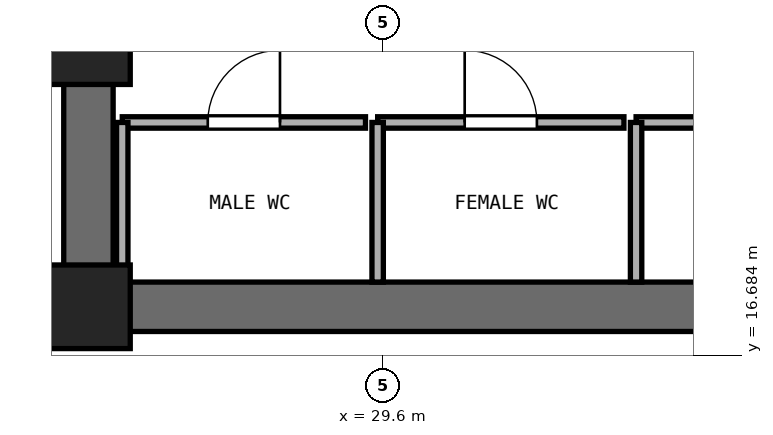
"""IFC4 building model, lengths in metres.
Left out: names, types, materials, properties, quantities, classifications, styles, units other than length and angle.
Written with IfcOpenShell. Run it as: python <this file> out.ifc"""

import sys

from ifc_helpers import new_model, si_unit, direction, frame, frame_2d, origin, origin_2d, place, context, subcontext, project, spatial, rectangle, extrude, element, fill, save


model = new_model("IFC4")
c1 = context("Model", 3, precision=1e-05, world=origin(), true_north=direction((0.0, 1.0)))
c2 = subcontext(c1, "Body", "Model", "MODEL_VIEW")
j1 = project(units=[si_unit("LENGTHUNIT", "METRE"), si_unit("PLANEANGLEUNIT", "RADIAN")], contexts=[c1])
p1 = place(None, origin())
s1 = spatial("IfcSite", under=j1, at=p1, CompositionType="ELEMENT")
p2 = place(p1, origin())
s2 = spatial("IfcBuilding", under=s1, at=p2, CompositionType="ELEMENT")
p3 = place(p2, frame((0.0, 0.0, 32.6)))
s3 = spatial("IfcBuildingStorey", under=s2, at=p3, CompositionType="ELEMENT", Elevation=32.6)
p4 = place(p3, frame((25.4, 17.325, 0.0), z_axis=(0.0, 0.0, 1.0), x_axis=(1.0, 0.0, 0.0)))
e1 = element("IfcWall", 1, at=p4, inside=s3, PredefinedType="SHEAR", context=c2, shape_type="SweptSolid", body=[
    extrude(rectangle(XDim=23.2, YDim=0.65, at=frame_2d((11.6, 0.0))), origin(), (0.0, 0.0, 1.0), 3.525),
])
p5 = place(p3, frame((25.725, 17.65, 0.0), z_axis=(0.0, 0.0, 1.0), x_axis=(0.0, 1.0, 0.0)))
e2 = element("IfcWall", 2, at=p5, inside=s3, PredefinedType="SHEAR", context=c2, shape_type="SweptSolid", body=[
    extrude(rectangle(XDim=15.1, YDim=0.65, at=frame_2d((7.55, 0.0))), origin(), (0.0, 0.0, 1.0), 3.525),
])
p6 = place(p5, frame((6.8, 0.0, 0.0)))
e3 = element("IfcOpeningElement", 3, at=p6, cuts=e2, PredefinedType="OPENING", context=c2, shape_type="SweptSolid", body=[
    extrude(rectangle(XDim=1.5, YDim=2.15, at=frame_2d((0.75, 1.075))), frame((0.0, 0.335, 0.0), z_axis=(0.0, -1.0, 0.0), x_axis=(1.0, 0.0, 0.0)), (0.0, 0.0, 1.0), 0.67),
])
for number, where, z_axis, x_axis in (
    (4, (25.725, 17.325, 0.0), (0.0, 0.0, 1.0), (1.0, 0.0, 0.0)),
    (5, (25.725, 20.8, 0.0), (0.0, 0.0, 1.0), (1.0, 0.0, 0.0)),
):
    element("IfcColumn", number, at=place(p3, frame(where, z_axis=z_axis, x_axis=x_axis)), inside=s3, PredefinedType="PILASTER", context=c2, shape_type="SweptSolid", body=[
        extrude(rectangle(XDim=1.1, YDim=1.1, at=origin_2d()), origin(), (0.0, 0.0, 1.0), 3.8),
    ])
p7 = place(p3, frame((26.17, 19.75, 0.0), z_axis=(0.0, 0.0, 1.0), x_axis=(1.0, 0.0, 0.0)))
e6 = element("IfcWall", 6, at=p7, inside=s3, PredefinedType="PARTITIONING", context=c2, shape_type="SweptSolid", body=[
    extrude(rectangle(XDim=3.2, YDim=0.15, at=frame_2d((1.6, 0.0))), origin(), (0.0, 0.0, 1.0), 3.525),
])
p8 = place(p7, frame((1.125, 0.0, 0.0)))
e7 = element("IfcOpeningElement", 7, at=p8, cuts=e6, PredefinedType="OPENING", context=c2, shape_type="SweptSolid", body=[
    extrude(rectangle(XDim=0.95, YDim=2.1, at=frame_2d((0.475, 1.05))), frame((0.0, 0.085, 0.0), z_axis=(0.0, -1.0, 0.0), x_axis=(1.0, 0.0, 0.0)), (0.0, 0.0, 1.0), 0.17),
])
p9 = place(p3, frame((26.17, 17.65, 0.0), z_axis=(0.0, 0.0, 1.0), x_axis=(0.0, 1.0, 0.0)))
e8 = element("IfcWall", 8, at=p9, inside=s3, PredefinedType="PARTITIONING", context=c2, shape_type="SweptSolid", body=[
    extrude(rectangle(XDim=2.1, YDim=0.15, at=frame_2d((1.05, 0.0))), origin(), (0.0, 0.0, 1.0), 3.525),
])
p10 = place(p3, frame((29.53, 19.75, 0.0), z_axis=(0.0, 0.0, 1.0), x_axis=(1.0, 0.0, 0.0)))
e9 = element("IfcWall", 9, at=p10, inside=s3, PredefinedType="PARTITIONING", context=c2, shape_type="SweptSolid", body=[
    extrude(rectangle(XDim=3.24, YDim=0.15, at=frame_2d((1.62, 0.0))), origin(), (0.0, 0.0, 1.0), 3.525),
])
p11 = place(p10, frame((1.145, 0.0, 0.0)))
e10 = element("IfcOpeningElement", 10, at=p11, cuts=e9, PredefinedType="OPENING", context=c2, shape_type="SweptSolid", body=[
    extrude(rectangle(XDim=0.95, YDim=2.1, at=frame_2d((0.475, 1.05))), frame((0.0, 0.085, 0.0), z_axis=(0.0, -1.0, 0.0), x_axis=(1.0, 0.0, 0.0)), (0.0, 0.0, 1.0), 0.17),
])
p12 = place(p3, frame((29.53, 17.65, 0.0), z_axis=(0.0, 0.0, 1.0), x_axis=(0.0, 1.0, 0.0)))
e11 = element("IfcWall", 11, at=p12, inside=s3, PredefinedType="PARTITIONING", context=c2, shape_type="SweptSolid", body=[
    extrude(rectangle(XDim=2.1, YDim=0.15, at=frame_2d((1.05, 0.0))), origin(), (0.0, 0.0, 1.0), 3.525),
])
p13 = place(p3, frame((32.93, 19.75, 0.0), z_axis=(0.0, 0.0, 1.0), x_axis=(1.0, 0.0, 0.0)))
e12 = element("IfcWall", 12, at=p13, inside=s3, PredefinedType="PARTITIONING", context=c2, shape_type="SweptSolid", body=[
    extrude(rectangle(XDim=3.92, YDim=0.15, at=frame_2d((1.96, 0.0))), origin(), (0.0, 0.0, 1.0), 3.525),
])
p14 = place(p13, frame((1.51, 0.0, 0.0)))
e13 = element("IfcOpeningElement", 13, at=p14, cuts=e12, PredefinedType="OPENING", context=c2, shape_type="SweptSolid", body=[
    extrude(rectangle(XDim=0.9, YDim=2.1, at=frame_2d((0.45, 1.05))), frame((0.0, 0.085, 0.0), z_axis=(0.0, -1.0, 0.0), x_axis=(1.0, 0.0, 0.0)), (0.0, 0.0, 1.0), 0.17),
])
p15 = place(p3, frame((32.93, 17.65, 0.0), z_axis=(0.0, 0.0, 1.0), x_axis=(0.0, 1.0, 0.0)))
e14 = element("IfcWall", 14, at=p15, inside=s3, PredefinedType="PARTITIONING", context=c2, shape_type="SweptSolid", body=[
    extrude(rectangle(XDim=2.1, YDim=0.15, at=frame_2d((1.05, 0.0))), origin(), (0.0, 0.0, 1.0), 3.525),
])
p16 = place(p8, origin())
e15 = element("IfcDoor", 15, at=p16, inside=s3, OperationType="SINGLE_SWING_RIGHT", PredefinedType="DOOR", context=c2, shape_type="SweptSolid", body=[
    extrude(rectangle(XDim=0.95, YDim=2.1, at=frame_2d((0.475, 1.05))), frame((0.0, 0.025, 0.0), z_axis=(0.0, -1.0, 0.0), x_axis=(1.0, 0.0, 0.0)), (0.0, 0.0, 1.0), 0.05),
])
fill(e7, e15)
p17 = place(p11, origin())
e16 = element("IfcDoor", 16, at=p17, inside=s3, OperationType="SINGLE_SWING_LEFT", PredefinedType="DOOR", context=c2, shape_type="SweptSolid", body=[
    extrude(rectangle(XDim=0.95, YDim=2.1, at=frame_2d((0.475, 1.05))), frame((0.0, 0.025, 0.0), z_axis=(0.0, -1.0, 0.0), x_axis=(1.0, 0.0, 0.0)), (0.0, 0.0, 1.0), 0.05),
])
fill(e10, e16)
save(model, sys.argv[1])
